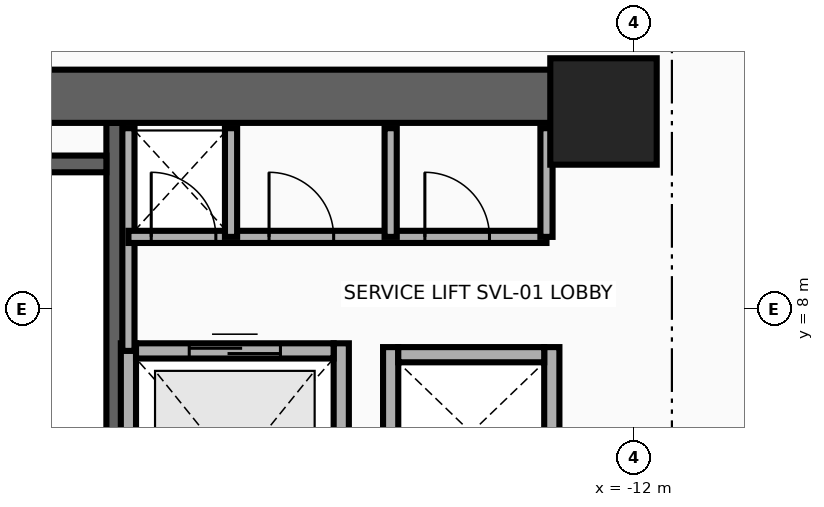
"""IFC4 building model, lengths in metres.
Left out: names, types, materials, properties, quantities, classifications, styles, units other than length and angle.
Written with IfcOpenShell. Run it as: python <this file> out.ifc"""

import sys

from ifc_helpers import new_model, si_unit, direction, frame, frame_2d, origin, origin_2d, place, context, subcontext, project, spatial, rectangle, extrude, source, transform, mapped, element, fill, save


model = new_model("IFC4")
c1 = context("Model", 3, precision=1e-05, world=origin(), true_north=direction((0.0, 1.0)))
c2 = subcontext(c1, "Body", "Model", "MODEL_VIEW")
j1 = project(units=[si_unit("LENGTHUNIT", "METRE"), si_unit("PLANEANGLEUNIT", "RADIAN")], contexts=[c1])
p1 = place(None, origin())
s1 = spatial("IfcSite", under=j1, at=p1, CompositionType="ELEMENT")
p2 = place(p1, origin())
s2 = spatial("IfcBuilding", under=s1, at=p2, CompositionType="ELEMENT")
p3 = place(p2, frame((0.0, 0.0, 26.0)))
s3 = spatial("IfcBuildingStorey", under=s2, at=p3, CompositionType="ELEMENT", Elevation=26.0)
p4 = place(p3, frame((-18.83, 1.78, 0.0), z_axis=(0.0, 0.0, 1.0), x_axis=(0.0, 1.0, 0.0)))
e1 = element("IfcWall", 1, at=p4, inside=s3, PredefinedType="SHEAR", context=c2, shape_type="SweptSolid", body=[
    extrude(rectangle(XDim=8.67, YDim=0.22, at=frame_2d((4.335, 0.0))), origin(), (0.0, 0.0, 1.0), 3.46),
])
p5 = place(p3, frame((-22.05, 9.91, 0.0), z_axis=(0.0, 0.0, 1.0), x_axis=(1.0, 0.0, 0.0)))
e2 = element("IfcWall", 2, at=p5, inside=s3, PredefinedType="SHEAR", context=c2, shape_type="SweptSolid", body=[
    extrude(rectangle(XDim=3.11, YDim=0.22, at=frame_2d((1.555, 0.0))), origin(), (0.0, 0.0, 1.0), 3.46),
])
p6 = place(p3, frame((-22.65, 10.8, 0.0), z_axis=(0.0, 0.0, 1.0), x_axis=(1.0, 0.0, 0.0)))
e3 = element("IfcWall", 3, at=p6, inside=s3, PredefinedType="SHEAR", context=c2, shape_type="SweptSolid", body=[
    extrude(rectangle(XDim=10.25, YDim=0.7, at=frame_2d((5.125, 0.0))), origin(), (0.0, 0.0, 1.0), 3.46),
])
m1 = source(origin(), c2, "Body", "SweptSolid", [
    extrude(rectangle(XDim=1.4, YDim=1.4, at=origin_2d()), origin(), (0.0, 0.0, 1.0), 3.7),
])
p7 = place(p3, frame((-12.4, 10.6, 0.0), z_axis=(0.0, 0.0, 1.0), x_axis=(1.0, 0.0, 0.0)))
e4 = element("IfcColumn", 4, at=p7, inside=s3, PredefinedType="COLUMN", context=c2, shape_type="MappedRepresentation", body=[
    mapped(m1, transform((0.0, 0.0, 0.0), x_axis=(1.0, 0.0, 0.0), y_axis=(0.0, 1.0, 0.0), z_axis=(0.0, 0.0, 1.0), scale=1.0)),
])
for number, where, z_axis, x_axis in (
    (5, (-18.65, 4.225, 0.0), (0.0, 0.0, 1.0), (0.0, 1.0, 0.0)),
    (6, (-15.85, 4.225, 0.0), (0.0, 0.0, 1.0), (0.0, 1.0, 0.0)),
):
    element("IfcWall", number, at=place(p3, frame(where, z_axis=z_axis, x_axis=x_axis)), inside=s3, PredefinedType="MOVABLE", context=c2, shape_type="SweptSolid", body=[
        extrude(rectangle(XDim=3.325, YDim=0.2, at=frame_2d((1.663, 0.0))), origin(), (0.0, 0.0, 1.0), 3.46),
    ])
p8 = place(p3, frame((-18.55, 7.45, 0.0), z_axis=(0.0, 0.0, 1.0), x_axis=(1.0, 0.0, 0.0)))
e7 = element("IfcWall", 7, at=p8, inside=s3, PredefinedType="MOVABLE", context=c2, shape_type="SweptSolid", body=[
    extrude(rectangle(XDim=2.6, YDim=0.2, at=frame_2d((1.3, 0.0))), origin(), (0.0, 0.0, 1.0), 3.46),
])
p9 = place(p8, frame((0.7, 0.0, 0.0)))
e8 = element("IfcOpeningElement", 8, at=p9, cuts=e7, PredefinedType="OPENING", context=c2, shape_type="SweptSolid", body=[
    extrude(rectangle(XDim=1.2, YDim=2.1, at=frame_2d((0.6, 1.05))), frame((0.0, 0.115, 0.0), z_axis=(0.0, -1.0, 0.0), x_axis=(1.0, 0.0, 0.0)), (0.0, 0.0, 1.0), 0.23),
])
for number, where, z_axis, x_axis in (
    (9, (-15.2, 5.25, 0.0), (0.0, 0.0, 1.0), (0.0, 1.0, 0.0)),
    (10, (-13.08, 5.25, 0.0), (0.0, 0.0, 1.0), (0.0, 1.0, 0.0)),
):
    element("IfcWall", number, at=place(p3, frame(where, z_axis=z_axis, x_axis=x_axis)), inside=s3, PredefinedType="MOVABLE", context=c2, shape_type="SweptSolid", body=[
        extrude(rectangle(XDim=2.25, YDim=0.2, at=frame_2d((1.125, 0.0))), origin(), (0.0, 0.0, 1.0), 3.46),
    ])
p10 = place(p3, frame((-15.1, 7.4, 0.0), z_axis=(0.0, 0.0, 1.0), x_axis=(1.0, 0.0, 0.0)))
e11 = element("IfcWall", 11, at=p10, inside=s3, PredefinedType="MOVABLE", context=c2, shape_type="SweptSolid", body=[
    extrude(rectangle(XDim=1.92, YDim=0.2, at=frame_2d((0.96, 0.0))), origin(), (0.0, 0.0, 1.0), 3.46),
])
p11 = place(p3, frame((-18.65, 7.45, 0.0), z_axis=(0.0, 0.0, 1.0), x_axis=(0.0, 1.0, 0.0)))
e12 = element("IfcWall", 12, at=p11, inside=s3, PredefinedType="PARTITIONING", context=c2, shape_type="SweptSolid", body=[
    extrude(rectangle(XDim=2.93, YDim=0.16, at=frame_2d((1.465, 0.0))), origin(), (0.0, 0.0, 1.0), 3.46),
])
p12 = place(p3, frame((-18.65, 8.95, 0.0), z_axis=(0.0, 0.0, 1.0), x_axis=(1.0, 0.0, 0.0)))
e13 = element("IfcWall", 13, at=p12, inside=s3, PredefinedType="PARTITIONING", context=c2, shape_type="SweptSolid", body=[
    extrude(rectangle(XDim=5.5, YDim=0.16, at=frame_2d((2.75, 0.0))), origin(), (0.0, 0.0, 1.0), 3.46),
])
p13 = place(p12, frame((0.3, 0.0, 0.0)))
e14 = element("IfcOpeningElement", 14, at=p13, cuts=e13, PredefinedType="OPENING", context=c2, shape_type="SweptSolid", body=[
    extrude(rectangle(XDim=0.85, YDim=2.05, at=frame_2d((0.425, 1.025))), frame((0.0, 0.095, 0.0), z_axis=(0.0, -1.0, 0.0), x_axis=(1.0, 0.0, 0.0)), (0.0, 0.0, 1.0), 0.19),
])
p14 = place(p12, frame((1.85, 0.0, 0.0)))
e15 = element("IfcOpeningElement", 15, at=p14, cuts=e13, PredefinedType="OPENING", context=c2, shape_type="SweptSolid", body=[
    extrude(rectangle(XDim=0.85, YDim=2.05, at=frame_2d((0.425, 1.025))), frame((0.0, 0.095, 0.0), z_axis=(0.0, -1.0, 0.0), x_axis=(1.0, 0.0, 0.0)), (0.0, 0.0, 1.0), 0.19),
])
p15 = place(p12, frame((3.9, 0.0, 0.0)))
e16 = element("IfcOpeningElement", 16, at=p15, cuts=e13, PredefinedType="OPENING", context=c2, shape_type="SweptSolid", body=[
    extrude(rectangle(XDim=0.85, YDim=2.05, at=frame_2d((0.425, 1.025))), frame((0.0, 0.095, 0.0), z_axis=(0.0, -1.0, 0.0), x_axis=(1.0, 0.0, 0.0)), (0.0, 0.0, 1.0), 0.19),
])
for number, where, z_axis, x_axis in (
    (17, (-13.15, 8.95, 0.0), (0.0, 0.0, 1.0), (0.0, 1.0, 0.0)),
    (18, (-17.3, 8.95, 0.0), (0.0, 0.0, 1.0), (0.0, 1.0, 0.0)),
    (19, (-15.2, 8.95, 0.0), (0.0, 0.0, 1.0), (0.0, 1.0, 0.0)),
):
    element("IfcWall", number, at=place(p3, frame(where, z_axis=z_axis, x_axis=x_axis)), inside=s3, PredefinedType="PARTITIONING", context=c2, shape_type="SweptSolid", body=[
        extrude(rectangle(XDim=1.43, YDim=0.16, at=frame_2d((0.715, 0.0))), origin(), (0.0, 0.0, 1.0), 3.46),
    ])
p16 = place(p9, origin())
e20 = element("IfcDoor", 20, at=p16, inside=s3, OperationType="DOUBLE_DOOR_SLIDING", PredefinedType="DOOR", context=c2, shape_type="SweptSolid", body=[
    extrude(rectangle(XDim=1.2, YDim=2.1, at=frame_2d((0.6, 1.05))), frame((0.0, 0.025, 0.0), z_axis=(0.0, -1.0, 0.0), x_axis=(1.0, 0.0, 0.0)), (0.0, 0.0, 1.0), 0.05),
])
fill(e8, e20)
p17 = place(p13, origin())
e21 = element("IfcDoor", 21, at=p17, inside=s3, OperationType="SINGLE_SWING_LEFT", PredefinedType="DOOR", context=c2, shape_type="SweptSolid", body=[
    extrude(rectangle(XDim=0.85, YDim=2.05, at=frame_2d((0.425, 1.025))), frame((0.0, 0.025, 0.0), z_axis=(0.0, -1.0, 0.0), x_axis=(1.0, 0.0, 0.0)), (0.0, 0.0, 1.0), 0.05),
])
fill(e14, e21)
p18 = place(p14, origin())
e22 = element("IfcDoor", 22, at=p18, inside=s3, OperationType="SINGLE_SWING_RIGHT", PredefinedType="DOOR", context=c2, shape_type="SweptSolid", body=[
    extrude(rectangle(XDim=0.85, YDim=2.05, at=frame_2d((0.425, 1.025))), frame((0.0, 0.025, 0.0), z_axis=(0.0, -1.0, 0.0), x_axis=(1.0, 0.0, 0.0)), (0.0, 0.0, 1.0), 0.05),
])
fill(e15, e22)
p19 = place(p15, origin())
e23 = element("IfcDoor", 23, at=p19, inside=s3, OperationType="SINGLE_SWING_LEFT", PredefinedType="DOOR", context=c2, shape_type="SweptSolid", body=[
    extrude(rectangle(XDim=0.85, YDim=2.05, at=frame_2d((0.425, 1.025))), frame((0.0, 0.025, 0.0), z_axis=(0.0, -1.0, 0.0), x_axis=(1.0, 0.0, 0.0)), (0.0, 0.0, 1.0), 0.05),
])
fill(e16, e23)
save(model, sys.argv[1])
